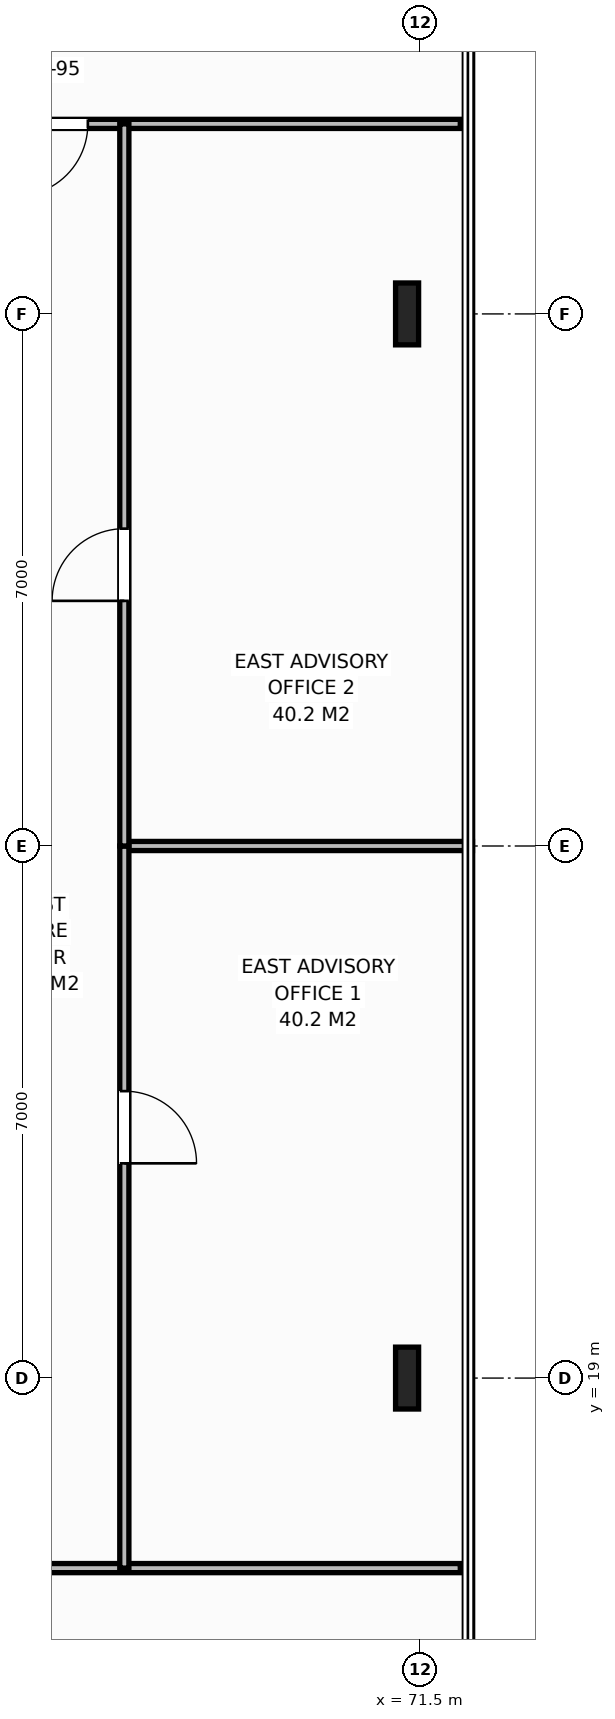
"""IFC4 building model, lengths in metres.
Left out: names, types, materials, properties, quantities, classifications, styles, units other than length and angle.
Written with IfcOpenShell. Run it as: python <this file> out.ifc"""

import sys

from ifc_helpers import new_model, si_unit, direction, frame, frame_2d, origin, origin_2d, place, context, subcontext, project, spatial, rectangle, i_section, extrude, element, fill, save


model = new_model("IFC4")
c1 = context("Model", 3, precision=1e-05, world=origin(), true_north=direction((0.0, 1.0)))
c2 = subcontext(c1, "Body", "Model", "MODEL_VIEW")
j1 = project(units=[si_unit("LENGTHUNIT", "METRE"), si_unit("PLANEANGLEUNIT", "RADIAN")], contexts=[c1])
p1 = place(None, origin())
s1 = spatial("IfcSite", under=j1, at=p1, CompositionType="ELEMENT")
p2 = place(p1, origin())
s2 = spatial("IfcBuilding", under=s1, at=p2, CompositionType="ELEMENT")
p3 = place(p2, frame((0.0, 0.0, 210.0)))
s3 = spatial("IfcBuildingStorey", under=s2, at=p3, CompositionType="ELEMENT", Elevation=210.0)
for number, where, z_axis, x_axis in (
    (1, (71.32, 19.0, 0.0), (0.0, 0.0, 1.0), (1.0, 0.0, 0.0)),
    (2, (71.32, 33.0, 0.0), (0.0, 0.0, 1.0), (1.0, 0.0, 0.0)),
):
    element("IfcColumn", number, at=place(p3, frame(where, z_axis=z_axis, x_axis=x_axis)), inside=s3, PredefinedType="COLUMN", context=c2, shape_type="SweptSolid", body=[
        extrude(i_section(OverallWidth=0.303, OverallDepth=0.814, WebThickness=0.021, FlangeThickness=0.04, at=origin_2d()), origin(), (0.0, 0.0, 1.0), 3.8),
    ])
p4 = place(p3, frame((64.86, 35.5, 0.0), z_axis=(0.0, 0.0, 1.0), x_axis=(1.0, 0.0, 0.0)))
e3 = element("IfcWall", 3, at=p4, inside=s3, PredefinedType="PARTITIONING", context=c2, shape_type="SweptSolid", body=[
    extrude(rectangle(XDim=7.16, YDim=0.12, at=frame_2d((3.58, 0.0))), origin(), (0.0, 0.0, 1.0), 3.58),
])
p5 = place(p4, frame((1.31, 0.0, 0.0)))
e4 = element("IfcOpeningElement", 4, at=p5, cuts=e3, PredefinedType="OPENING", context=c2, shape_type="SweptSolid", body=[
    extrude(rectangle(XDim=0.95, YDim=2.15, at=frame_2d((0.475, 1.075))), frame((0.0, 0.07, 0.0), z_axis=(0.0, -1.0, 0.0), x_axis=(1.0, 0.0, 0.0)), (0.0, 0.0, 1.0), 0.14),
])
p6 = place(p3, frame((58.377, 16.5, 0.0), z_axis=(0.0, 0.0, 1.0), x_axis=(1.0, 0.0, 0.0)))
e5 = element("IfcWall", 5, at=p6, inside=s3, PredefinedType="PARTITIONING", context=c2, shape_type="SweptSolid", body=[
    extrude(rectangle(XDim=13.643, YDim=0.12, at=frame_2d((6.822, 0.0))), origin(), (0.0, 0.0, 1.0), 3.58),
])
p7 = place(p6, frame((4.137, 0.0, 0.0)))
e6 = element("IfcOpeningElement", 6, at=p7, cuts=e5, PredefinedType="OPENING", context=c2, shape_type="SweptSolid", body=[
    extrude(rectangle(XDim=0.95, YDim=2.15, at=frame_2d((0.475, 1.075))), frame((0.0, 0.07, 0.0), z_axis=(0.0, -1.0, 0.0), x_axis=(1.0, 0.0, 0.0)), (0.0, 0.0, 1.0), 0.14),
])
p8 = place(p3, frame((67.6, 26.0, 0.0), z_axis=(0.0, 0.0, 1.0), x_axis=(1.0, 0.0, 0.0)))
e7 = element("IfcWall", 7, at=p8, inside=s3, PredefinedType="PARTITIONING", context=c2, shape_type="SweptSolid", body=[
    extrude(rectangle(XDim=4.58, YDim=0.12, at=frame_2d((2.29, 0.0))), origin(), (0.0, 0.0, 1.0), 3.58),
])
p9 = place(p3, frame((67.6, 16.5, 0.0), z_axis=(0.0, 0.0, 1.0), x_axis=(0.0, 1.0, 0.0)))
e8 = element("IfcWall", 8, at=p9, inside=s3, PredefinedType="PARTITIONING", context=c2, shape_type="SweptSolid", body=[
    extrude(rectangle(XDim=9.5, YDim=0.12, at=frame_2d((4.75, 0.0))), origin(), (0.0, 0.0, 1.0), 3.58),
])
p10 = place(p9, frame((5.325, 0.0, 0.0)))
e9 = element("IfcOpeningElement", 9, at=p10, cuts=e8, PredefinedType="OPENING", context=c2, shape_type="SweptSolid", body=[
    extrude(rectangle(XDim=0.95, YDim=2.15, at=frame_2d((0.475, 1.075))), frame((0.0, 0.07, 0.0), z_axis=(0.0, -1.0, 0.0), x_axis=(1.0, 0.0, 0.0)), (0.0, 0.0, 1.0), 0.14),
])
p11 = place(p3, frame((67.6, 26.0, 0.0), z_axis=(0.0, 0.0, 1.0), x_axis=(0.0, 1.0, 0.0)))
e10 = element("IfcWall", 10, at=p11, inside=s3, PredefinedType="PARTITIONING", context=c2, shape_type="SweptSolid", body=[
    extrude(rectangle(XDim=9.5, YDim=0.12, at=frame_2d((4.75, 0.0))), origin(), (0.0, 0.0, 1.0), 3.58),
])
p12 = place(p11, frame((3.225, 0.0, 0.0)))
e11 = element("IfcOpeningElement", 11, at=p12, cuts=e10, PredefinedType="OPENING", context=c2, shape_type="SweptSolid", body=[
    extrude(rectangle(XDim=0.95, YDim=2.15, at=frame_2d((0.475, 1.075))), frame((0.0, 0.07, 0.0), z_axis=(0.0, -1.0, 0.0), x_axis=(1.0, 0.0, 0.0)), (0.0, 0.0, 1.0), 0.14),
])
p13 = place(p5, origin())
e12 = element("IfcDoor", 12, at=p13, inside=s3, OperationType="SINGLE_SWING_RIGHT", PredefinedType="DOOR", context=c2, shape_type="SweptSolid", body=[
    extrude(rectangle(XDim=0.95, YDim=2.15, at=frame_2d((0.475, 1.075))), frame((0.0, 0.025, 0.0), z_axis=(0.0, -1.0, 0.0), x_axis=(1.0, 0.0, 0.0)), (0.0, 0.0, 1.0), 0.05),
])
fill(e4, e12)
p14 = place(p10, origin())
e13 = element("IfcDoor", 13, at=p14, inside=s3, OperationType="SINGLE_SWING_RIGHT", PredefinedType="DOOR", context=c2, shape_type="SweptSolid", body=[
    extrude(rectangle(XDim=0.95, YDim=2.15, at=frame_2d((0.475, 1.075))), frame((0.0, 0.025, 0.0), z_axis=(0.0, -1.0, 0.0), x_axis=(1.0, 0.0, 0.0)), (0.0, 0.0, 1.0), 0.05),
])
fill(e9, e13)
p15 = place(p12, origin())
e14 = element("IfcDoor", 14, at=p15, inside=s3, OperationType="SINGLE_SWING_LEFT", PredefinedType="DOOR", context=c2, shape_type="SweptSolid", body=[
    extrude(rectangle(XDim=0.95, YDim=2.15, at=frame_2d((0.475, 1.075))), frame((0.0, 0.025, 0.0), z_axis=(0.0, -1.0, 0.0), x_axis=(1.0, 0.0, 0.0)), (0.0, 0.0, 1.0), 0.05),
])
fill(e11, e14)
save(model, sys.argv[1])
